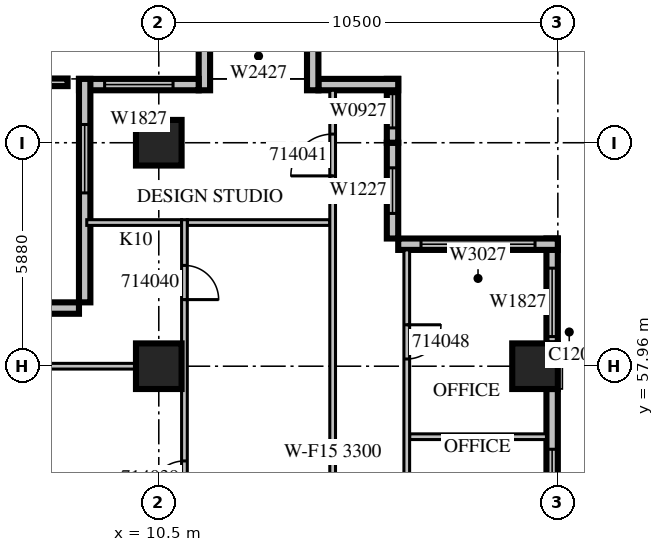
"""IFC4 building model, lengths in metres.
Left out: names, types, materials, properties, quantities, classifications, styles, units other than length and angle.
Written with IfcOpenShell. Run it as: python <this file> out.ifc"""

import sys

from ifc_helpers import new_model, si_unit, direction, frame, frame_2d, origin, origin_2d, place, context, subcontext, project, spatial, rectangle, extrude, source, transform, mapped, element, fill, save


model = new_model("IFC4")
c1 = context("Model", 3, precision=1e-05, world=origin(), true_north=direction((0.0, 1.0)))
c2 = subcontext(c1, "Body", "Model", "MODEL_VIEW")
j1 = project(units=[si_unit("LENGTHUNIT", "METRE"), si_unit("PLANEANGLEUNIT", "RADIAN")], contexts=[c1])
p1 = place(None, origin())
s1 = spatial("IfcSite", under=j1, at=p1, CompositionType="ELEMENT")
p2 = place(p1, origin())
s2 = spatial("IfcBuilding", under=s1, at=p2, CompositionType="ELEMENT")
p3 = place(p2, frame((0.0, 0.0, 69.9)))
s3 = spatial("IfcBuildingStorey", under=s2, at=p3, CompositionType="ELEMENT", Elevation=69.9)
m1 = source(origin(), c2, "Body", "SweptSolid", [
    extrude(rectangle(XDim=1.2, YDim=1.2, at=origin_2d()), origin(), (0.0, 0.0, 1.0), 4.2),
])
for number, where, z_axis, x_axis in (
    (1, (10.5, 57.96, 0.0), (0.0, 0.0, 1.0), (1.0, 0.0, 0.0)),
    (2, (20.4, 57.96, 0.0), (0.0, 0.0, 1.0), (1.0, 0.0, 0.0)),
    (3, (10.5, 63.84, 0.0), (0.0, 0.0, 1.0), (1.0, 0.0, 0.0)),
):
    element("IfcColumn", number, at=place(p3, frame(where, z_axis=z_axis, x_axis=x_axis)), inside=s3, PredefinedType="COLUMN", context=c2, shape_type="MappedRepresentation", body=[
        mapped(m1, transform((0.0, 0.0, 0.0), scale=1.0)),
    ])
m2 = source(origin(), c2, "Body", "SweptSolid", [
    extrude(rectangle(XDim=4.68, YDim=0.3, at=frame_2d((2.34, 0.0))), origin(), (0.0, 0.0, 1.0), 3.8),
])
p4 = place(p3, frame((20.85, 52.68, 0.0), z_axis=(0.0, 0.0, 1.0), x_axis=(0.0, 1.0, 0.0)))
e4 = element("IfcWall", 4, at=p4, inside=s3, PredefinedType="STANDARD", context=c2, shape_type="MappedRepresentation", body=[
    mapped(m2, transform((0.0, 0.0, 0.0), scale=1.0)),
])
m3 = source(origin(), c2, "Body", "SweptSolid", [
    extrude(rectangle(XDim=2.4, YDim=2.7, at=frame_2d((1.2, 1.35))), frame((0.0, 0.16, 0.0), z_axis=(0.0, -1.0, 0.0), x_axis=(1.0, 0.0, 0.0)), (0.0, 0.0, 1.0), 0.32),
])
p5 = place(p4, frame((0.695, 0.0, 0.6)))
e5 = element("IfcOpeningElement", 5, at=p5, cuts=e4, PredefinedType="OPENING", context=c2, shape_type="MappedRepresentation", body=[
    mapped(m3, transform((0.0, 0.0, 0.0), scale=1.0)),
])
m4 = source(origin(), c2, "Body", "SweptSolid", [
    extrude(rectangle(XDim=2.76, YDim=0.3, at=frame_2d((1.38, 0.0))), origin(), (0.0, 0.0, 1.0), 3.8),
])
p6 = place(p3, frame((20.85, 58.56, 0.0), z_axis=(0.0, 0.0, 1.0), x_axis=(0.0, 1.0, 0.0)))
e6 = element("IfcWall", 6, at=p6, inside=s3, PredefinedType="STANDARD", context=c2, shape_type="MappedRepresentation", body=[
    mapped(m4, transform((0.0, 0.0, 0.0), scale=1.0)),
])
m5 = source(origin(), c2, "Body", "SweptSolid", [
    extrude(rectangle(XDim=1.8, YDim=2.7, at=frame_2d((0.9, 1.35))), frame((0.0, 0.16, 0.0), z_axis=(0.0, -1.0, 0.0), x_axis=(1.0, 0.0, 0.0)), (0.0, 0.0, 1.0), 0.32),
])
p7 = place(p6, frame((0.18, 0.0, 0.6)))
e7 = element("IfcOpeningElement", 7, at=p7, cuts=e6, PredefinedType="OPENING", context=c2, shape_type="MappedRepresentation", body=[
    mapped(m5, transform((0.0, 0.0, 0.0), scale=1.0)),
])
m6 = source(origin(), c2, "Body", "SweptSolid", [
    extrude(rectangle(XDim=4.2, YDim=0.3, at=frame_2d((2.1, 0.0))), origin(), (0.0, 0.0, 1.0), 3.8),
])
p8 = place(p3, frame((21.0, 61.17, 0.0), z_axis=(0.0, 0.0, 1.0), x_axis=(-1.0, 0.0, 0.0)))
e8 = element("IfcWall", 8, at=p8, inside=s3, PredefinedType="STANDARD", context=c2, shape_type="MappedRepresentation", body=[
    mapped(m6, transform((0.0, 0.0, 0.0), scale=1.0)),
])
m7 = source(origin(), c2, "Body", "SweptSolid", [
    extrude(rectangle(XDim=3.0, YDim=2.7, at=frame_2d((1.5, 1.35))), frame((0.0, 0.16, 0.0), z_axis=(0.0, -1.0, 0.0), x_axis=(1.0, 0.0, 0.0)), (0.0, 0.0, 1.0), 0.32),
])
p9 = place(p8, frame((0.6, 0.0, 0.6)))
e9 = element("IfcOpeningElement", 9, at=p9, cuts=e8, PredefinedType="OPENING", context=c2, shape_type="MappedRepresentation", body=[
    mapped(m7, transform((0.0, 0.0, 0.0), scale=1.0)),
])
m8 = source(origin(), c2, "Body", "SweptSolid", [
    extrude(rectangle(XDim=2.52, YDim=0.3, at=frame_2d((1.26, 0.0))), origin(), (0.0, 0.0, 1.0), 3.8),
])
p10 = place(p3, frame((16.65, 61.32, 0.0), z_axis=(0.0, 0.0, 1.0), x_axis=(0.0, 1.0, 0.0)))
e10 = element("IfcWall", 10, at=p10, inside=s3, PredefinedType="STANDARD", context=c2, shape_type="MappedRepresentation", body=[
    mapped(m8, transform((0.0, 0.0, 0.0), scale=1.0)),
])
m9 = source(origin(), c2, "Body", "SweptSolid", [
    extrude(rectangle(XDim=1.2, YDim=2.7, at=frame_2d((0.6, 1.35))), frame((0.0, 0.16, 0.0), z_axis=(0.0, -1.0, 0.0), x_axis=(1.0, 0.0, 0.0)), (0.0, 0.0, 1.0), 0.32),
])
p11 = place(p10, frame((0.66, 0.0, 0.6)))
e11 = element("IfcOpeningElement", 11, at=p11, cuts=e10, PredefinedType="OPENING", context=c2, shape_type="MappedRepresentation", body=[
    mapped(m9, transform((0.0, 0.0, 0.0), scale=1.0)),
])
m10 = source(origin(), c2, "Body", "SweptSolid", [
    extrude(rectangle(XDim=1.68, YDim=0.3, at=frame_2d((0.84, 0.0))), origin(), (0.0, 0.0, 1.0), 3.8),
])
p12 = place(p3, frame((16.65, 63.84, 0.0), z_axis=(0.0, 0.0, 1.0), x_axis=(0.0, 1.0, 0.0)))
e12 = element("IfcWall", 12, at=p12, inside=s3, PredefinedType="STANDARD", context=c2, shape_type="MappedRepresentation", body=[
    mapped(m10, transform((0.0, 0.0, 0.0), scale=1.0)),
])
m11 = source(origin(), c2, "Body", "SweptSolid", [
    extrude(rectangle(XDim=0.9, YDim=2.7, at=frame_2d((0.45, 1.35))), frame((0.0, 0.16, 0.0), z_axis=(0.0, -1.0, 0.0), x_axis=(1.0, 0.0, 0.0)), (0.0, 0.0, 1.0), 0.32),
])
p13 = place(p12, frame((0.39, 0.0, 0.6)))
e13 = element("IfcOpeningElement", 13, at=p13, cuts=e12, PredefinedType="OPENING", context=c2, shape_type="MappedRepresentation", body=[
    mapped(m11, transform((0.0, 0.0, 0.0), scale=1.0)),
])
p14 = place(p3, frame((16.8, 65.37, 0.0), z_axis=(0.0, 0.0, 1.0), x_axis=(-1.0, 0.0, 0.0)))
e14 = element("IfcWall", 14, at=p14, inside=s3, PredefinedType="STANDARD", context=c2, shape_type="SweptSolid", body=[
    extrude(rectangle(XDim=2.1, YDim=0.3, at=frame_2d((1.05, 0.0))), origin(), (0.0, 0.0, 1.0), 3.8),
])
m12 = source(origin(), c2, "Body", "SweptSolid", [
    extrude(rectangle(XDim=1.2, YDim=0.3, at=frame_2d((0.6, 0.0))), origin(), (0.0, 0.0, 1.0), 3.8),
])
for number, where, z_axis, x_axis in (
    (15, (14.55, 65.22, 0.0), (0.0, 0.0, 1.0), (0.0, 1.0, 0.0)),
    (16, (11.7, 65.22, 0.0), (0.0, 0.0, 1.0), (0.0, 1.0, 0.0)),
):
    element("IfcWall", number, at=place(p3, frame(where, z_axis=z_axis, x_axis=x_axis)), inside=s3, PredefinedType="STANDARD", context=c2, shape_type="MappedRepresentation", body=[
        mapped(m12, transform((0.0, 0.0, 0.0), scale=1.0)),
    ])
m13 = source(origin(), c2, "Body", "SweptSolid", [
    extrude(rectangle(XDim=3.15, YDim=0.3, at=frame_2d((1.575, 0.0))), origin(), (0.0, 0.0, 1.0), 3.8),
])
p15 = place(p3, frame((11.55, 65.37, 0.0), z_axis=(0.0, 0.0, 1.0), x_axis=(-1.0, 0.0, 0.0)))
e17 = element("IfcWall", 17, at=p15, inside=s3, PredefinedType="STANDARD", context=c2, shape_type="MappedRepresentation", body=[
    mapped(m13, transform((0.0, 0.0, 0.0), scale=1.0)),
])
p16 = place(p15, frame((0.675, 0.0, 0.6)))
e18 = element("IfcOpeningElement", 18, at=p16, cuts=e17, PredefinedType="OPENING", context=c2, shape_type="MappedRepresentation", body=[
    mapped(m5, transform((0.0, 0.0, 0.0), scale=1.0)),
])
m14 = source(origin(), c2, "Body", "SweptSolid", [
    extrude(rectangle(XDim=5.88, YDim=0.3, at=frame_2d((2.94, 0.0))), origin(), (0.0, 0.0, 1.0), 3.8),
])
p17 = place(p3, frame((8.55, 65.52, 0.0), z_axis=(0.0, 0.0, 1.0), x_axis=(0.0, -1.0, 0.0)))
e19 = element("IfcWall", 19, at=p17, inside=s3, PredefinedType="STANDARD", context=c2, shape_type="MappedRepresentation", body=[
    mapped(m14, transform((0.0, 0.0, 0.0), scale=1.0)),
])
m15 = source(origin(), c2, "Body", "SweptSolid", [
    extrude(rectangle(XDim=1.8, YDim=2.4, at=frame_2d((0.9, 1.2))), frame((0.0, 0.16, 0.0), z_axis=(0.0, -1.0, 0.0), x_axis=(1.0, 0.0, 0.0)), (0.0, 0.0, 1.0), 0.32),
])
p18 = place(p17, frame((1.2, 0.0, 0.0)))
e20 = element("IfcOpeningElement", 20, at=p18, cuts=e19, PredefinedType="OPENING", context=c2, shape_type="MappedRepresentation", body=[
    mapped(m15, transform((0.0, 0.0, 0.0), scale=1.0)),
])
p19 = place(p3, frame((8.4, 59.49, 0.0), z_axis=(0.0, 0.0, 1.0), x_axis=(-1.0, 0.0, 0.0)))
e21 = element("IfcWall", 21, at=p19, inside=s3, PredefinedType="STANDARD", context=c2, shape_type="SweptSolid", body=[
    extrude(rectangle(XDim=8.4, YDim=0.3, at=frame_2d((4.2, 0.0))), origin(), (0.0, 0.0, 1.0), 3.8),
])
p20 = place(p19, frame((1.2, 0.0, 0.0)))
e22 = element("IfcOpeningElement", 22, at=p20, cuts=e21, PredefinedType="OPENING", context=c2, shape_type="MappedRepresentation", body=[
    mapped(m15, transform((0.0, 0.0, 0.0), scale=1.0)),
])
p21 = place(p19, frame((4.8, 0.0, 0.6)))
e23 = element("IfcOpeningElement", 23, at=p21, cuts=e21, PredefinedType="OPENING", context=c2, shape_type="MappedRepresentation", body=[
    mapped(m7, transform((0.0, 0.0, 0.0), scale=1.0)),
])
p22 = place(p3, frame((4.29, 65.43, 0.0), z_axis=(0.0, 0.0, 1.0), x_axis=(1.0, 0.0, 0.0)))
e24 = element("IfcWall", 24, at=p22, inside=s3, PredefinedType="PARAPET", context=c2, shape_type="SweptSolid", body=[
    extrude(rectangle(XDim=3.81, YDim=0.2, at=frame_2d((1.905, 0.0))), origin(), (0.0, 0.0, 1.0), 1.1),
])
m16 = source(origin(), c2, "Body", "SweptSolid", [
    extrude(rectangle(XDim=8.702, YDim=0.15, at=frame_2d((4.351, 0.0))), origin(), (0.0, 0.0, 1.0), 3.8),
])
p23 = place(p3, frame((9.901, 57.96, 0.0), z_axis=(0.0, 0.0, 1.0), x_axis=(-1.0, 0.0, 0.0)))
e25 = element("IfcWall", 25, at=p23, inside=s3, PredefinedType="PARTITIONING", context=c2, shape_type="MappedRepresentation", body=[
    mapped(m16, transform((0.0, 0.0, 0.0), scale=1.0)),
])
p24 = place(p3, frame((11.1, 61.74, 0.0), z_axis=(0.0, 0.0, 1.0), x_axis=(-1.0, 0.0, 0.0)))
e26 = element("IfcWall", 26, at=p24, inside=s3, PredefinedType="PARTITIONING", context=c2, shape_type="SweptSolid", body=[
    extrude(rectangle(XDim=2.495, YDim=0.15, at=frame_2d((1.248, 0.0))), origin(), (0.0, 0.0, 1.0), 3.8),
])
m17 = source(origin(), c2, "Body", "SweptSolid", [
    extrude(rectangle(XDim=3.75, YDim=0.15, at=frame_2d((1.875, 0.0))), origin(), (0.0, 0.0, 1.0), 3.8),
])
p25 = place(p3, frame((15.0, 61.74, 0.0), z_axis=(0.0, 0.0, 1.0), x_axis=(-1.0, 0.0, 0.0)))
e27 = element("IfcWall", 27, at=p25, inside=s3, PredefinedType="PARTITIONING", context=c2, shape_type="MappedRepresentation", body=[
    mapped(m17, transform((0.0, 0.0, 0.0), scale=1.0)),
])
p26 = place(p3, frame((11.175, 46.2, 0.0), z_axis=(0.0, 0.0, 1.0), x_axis=(0.0, 1.0, 0.0)))
e28 = element("IfcWall", 28, at=p26, inside=s3, PredefinedType="PARTITIONING", context=c2, shape_type="SweptSolid", body=[
    extrude(rectangle(XDim=15.615, YDim=0.15, at=frame_2d((7.808, 0.0))), origin(), (0.0, 0.0, 1.0), 3.3),
])
m18 = source(origin(), c2, "Body", "SweptSolid", [
    extrude(rectangle(XDim=0.9, YDim=2.1, at=frame_2d((0.45, 1.05))), frame((0.0, 0.085, 0.0), z_axis=(0.0, -1.0, 0.0), x_axis=(1.0, 0.0, 0.0)), (0.0, 0.0, 1.0), 0.17),
])
p27 = place(p26, frame((2.487, 0.0, 0.0)))
e29 = element("IfcOpeningElement", 29, at=p27, cuts=e28, PredefinedType="OPENING", context=c2, shape_type="MappedRepresentation", body=[
    mapped(m18, transform((0.0, 0.0, 0.0), scale=1.0)),
])
p28 = place(p26, frame((8.367, 0.0, 0.0)))
e30 = element("IfcOpeningElement", 30, at=p28, cuts=e28, PredefinedType="OPENING", context=c2, shape_type="MappedRepresentation", body=[
    mapped(m18, transform((0.0, 0.0, 0.0), scale=1.0)),
])
p29 = place(p26, frame((13.512, 0.0, 0.0)))
e31 = element("IfcOpeningElement", 31, at=p29, cuts=e28, PredefinedType="OPENING", context=c2, shape_type="MappedRepresentation", body=[
    mapped(m18, transform((0.0, 0.0, 0.0), scale=1.0)),
])
m19 = source(origin(), c2, "Body", "SweptSolid", [
    extrude(rectangle(XDim=3.6, YDim=0.15, at=frame_2d((1.8, 0.0))), origin(), (0.0, 0.0, 1.0), 3.8),
])
p30 = place(p3, frame((17.1, 56.105, 0.0), z_axis=(0.0, 0.0, 1.0), x_axis=(1.0, 0.0, 0.0)))
e32 = element("IfcWall", 32, at=p30, inside=s3, PredefinedType="PARTITIONING", context=c2, shape_type="MappedRepresentation", body=[
    mapped(m19, transform((0.0, 0.0, 0.0), scale=1.0)),
])
m20 = source(origin(), c2, "Body", "SweptSolid", [
    extrude(rectangle(XDim=19.02, YDim=0.15, at=frame_2d((9.51, 0.0))), origin(), (0.0, 0.0, 1.0), 3.3),
])
p31 = place(p3, frame((15.075, 46.2, 0.0), z_axis=(0.0, 0.0, 1.0), x_axis=(0.0, 1.0, 0.0)))
e33 = element("IfcWall", 33, at=p31, inside=s3, PredefinedType="PARTITIONING", context=c2, shape_type="MappedRepresentation", body=[
    mapped(m20, transform((0.0, 0.0, 0.0), scale=1.0)),
])
m21 = source(origin(), c2, "Body", "SweptSolid", [
    extrude(rectangle(XDim=1.2, YDim=2.1, at=frame_2d((0.6, 1.05))), frame((0.0, 0.085, 0.0), z_axis=(0.0, -1.0, 0.0), x_axis=(1.0, 0.0, 0.0)), (0.0, 0.0, 1.0), 0.17),
])
p32 = place(p31, frame((7.17, 0.0, 0.0)))
e34 = element("IfcOpeningElement", 34, at=p32, cuts=e33, PredefinedType="OPENING", context=c2, shape_type="MappedRepresentation", body=[
    mapped(m21, transform((0.0, 0.0, 0.0), scale=1.0)),
])
m22 = source(origin(), c2, "Body", "SweptSolid", [
    extrude(rectangle(XDim=1.1, YDim=2.1, at=frame_2d((0.55, 1.05))), frame((0.0, 0.085, 0.0), z_axis=(0.0, -1.0, 0.0), x_axis=(1.0, 0.0, 0.0)), (0.0, 0.0, 1.0), 0.17),
])
p33 = place(p31, frame((16.767, 0.0, 0.0)))
e35 = element("IfcOpeningElement", 35, at=p33, cuts=e33, PredefinedType="OPENING", context=c2, shape_type="MappedRepresentation", body=[
    mapped(m22, transform((0.0, 0.0, 0.0), scale=1.0)),
])
m23 = source(origin(), c2, "Body", "SweptSolid", [
    extrude(rectangle(XDim=31.62, YDim=0.15, at=frame_2d((15.81, 0.0))), origin(), (0.0, 0.0, 1.0), 3.3),
])
p34 = place(p3, frame((17.025, 61.02, 0.0), z_axis=(0.0, 0.0, 1.0), x_axis=(0.0, -1.0, 0.0)))
e36 = element("IfcWall", 36, at=p34, inside=s3, PredefinedType="PARTITIONING", context=c2, shape_type="MappedRepresentation", body=[
    mapped(m23, transform((0.0, 0.0, 0.0), scale=1.0)),
])
m24 = source(origin(), c2, "Body", "SweptSolid", [
    extrude(rectangle(XDim=1.0, YDim=2.1, at=frame_2d((0.5, 1.05))), frame((0.0, 0.085, 0.0), z_axis=(0.0, -1.0, 0.0), x_axis=(1.0, 0.0, 0.0)), (0.0, 0.0, 1.0), 0.17),
])
p35 = place(p34, frame((29.263, 0.0, 0.0)))
e37 = element("IfcOpeningElement", 37, at=p35, cuts=e36, PredefinedType="OPENING", context=c2, shape_type="MappedRepresentation", body=[
    mapped(m24, transform((0.0, 0.0, 0.0), scale=1.0)),
])
p36 = place(p34, frame((25.951, 0.0, 0.0)))
e38 = element("IfcOpeningElement", 38, at=p36, cuts=e36, PredefinedType="OPENING", context=c2, shape_type="MappedRepresentation", body=[
    mapped(m24, transform((0.0, 0.0, 0.0), scale=1.0)),
])
p37 = place(p34, frame((23.608, 0.0, 0.0)))
e39 = element("IfcOpeningElement", 39, at=p37, cuts=e36, PredefinedType="OPENING", context=c2, shape_type="MappedRepresentation", body=[
    mapped(m24, transform((0.0, 0.0, 0.0), scale=1.0)),
])
p38 = place(p34, frame((18.42, 0.0, 0.0)))
e40 = element("IfcOpeningElement", 40, at=p38, cuts=e36, PredefinedType="OPENING", context=c2, shape_type="MappedRepresentation", body=[
    mapped(m21, transform((0.0, 0.0, 0.0), scale=1.0)),
])
p39 = place(p34, frame((11.875, 0.0, 0.0)))
e41 = element("IfcOpeningElement", 41, at=p39, cuts=e36, PredefinedType="OPENING", context=c2, shape_type="MappedRepresentation", body=[
    mapped(m18, transform((0.0, 0.0, 0.0), scale=1.0)),
])
p40 = place(p34, frame((6.923, 0.0, 0.0)))
e42 = element("IfcOpeningElement", 42, at=p40, cuts=e36, PredefinedType="OPENING", context=c2, shape_type="MappedRepresentation", body=[
    mapped(m18, transform((0.0, 0.0, 0.0), scale=1.0)),
])
p41 = place(p34, frame((1.97, 0.0, 0.0)))
e43 = element("IfcOpeningElement", 43, at=p41, cuts=e36, PredefinedType="OPENING", context=c2, shape_type="MappedRepresentation", body=[
    mapped(m18, transform((0.0, 0.0, 0.0), scale=1.0)),
])
m25 = source(origin(), c2, "Body", "SweptSolid", [
    extrude(rectangle(XDim=2.4, YDim=2.7, at=frame_2d((1.2, 1.35))), frame((0.0, 0.03, 0.0), z_axis=(0.0, -1.0, 0.0), x_axis=(1.0, 0.0, 0.0)), (0.0, 0.0, 1.0), 0.06),
])
p42 = place(p5, origin())
e44 = element("IfcWindow", 44, at=p42, inside=s3, PartitioningType="SINGLE_PANEL", PredefinedType="WINDOW", context=c2, shape_type="MappedRepresentation", body=[
    mapped(m25, transform((0.0, 0.0, 0.0), scale=1.0)),
])
fill(e5, e44)
m26 = source(origin(), c2, "Body", "SweptSolid", [
    extrude(rectangle(XDim=1.8, YDim=2.7, at=frame_2d((0.9, 1.35))), frame((0.0, 0.03, 0.0), z_axis=(0.0, -1.0, 0.0), x_axis=(1.0, 0.0, 0.0)), (0.0, 0.0, 1.0), 0.06),
])
p43 = place(p7, origin())
e45 = element("IfcWindow", 45, at=p43, inside=s3, PartitioningType="SINGLE_PANEL", PredefinedType="WINDOW", context=c2, shape_type="MappedRepresentation", body=[
    mapped(m26, transform((0.0, 0.0, 0.0), scale=1.0)),
])
fill(e7, e45)
m27 = source(origin(), c2, "Body", "SweptSolid", [
    extrude(rectangle(XDim=3.0, YDim=2.7, at=frame_2d((1.5, 1.35))), frame((0.0, 0.03, 0.0), z_axis=(0.0, -1.0, 0.0), x_axis=(1.0, 0.0, 0.0)), (0.0, 0.0, 1.0), 0.06),
])
p44 = place(p9, origin())
e46 = element("IfcWindow", 46, at=p44, inside=s3, PartitioningType="SINGLE_PANEL", PredefinedType="WINDOW", context=c2, shape_type="MappedRepresentation", body=[
    mapped(m27, transform((0.0, 0.0, 0.0), scale=1.0)),
])
fill(e9, e46)
m28 = source(origin(), c2, "Body", "SweptSolid", [
    extrude(rectangle(XDim=1.2, YDim=2.7, at=frame_2d((0.6, 1.35))), frame((0.0, 0.03, 0.0), z_axis=(0.0, -1.0, 0.0), x_axis=(1.0, 0.0, 0.0)), (0.0, 0.0, 1.0), 0.06),
])
p45 = place(p11, origin())
e47 = element("IfcWindow", 47, at=p45, inside=s3, PartitioningType="SINGLE_PANEL", PredefinedType="WINDOW", context=c2, shape_type="MappedRepresentation", body=[
    mapped(m28, transform((0.0, 0.0, 0.0), scale=1.0)),
])
fill(e11, e47)
m29 = source(origin(), c2, "Body", "SweptSolid", [
    extrude(rectangle(XDim=0.9, YDim=2.7, at=frame_2d((0.45, 1.35))), frame((0.0, 0.03, 0.0), z_axis=(0.0, -1.0, 0.0), x_axis=(1.0, 0.0, 0.0)), (0.0, 0.0, 1.0), 0.06),
])
p46 = place(p13, origin())
e48 = element("IfcWindow", 48, at=p46, inside=s3, PartitioningType="SINGLE_PANEL", PredefinedType="WINDOW", context=c2, shape_type="MappedRepresentation", body=[
    mapped(m29, transform((0.0, 0.0, 0.0), scale=1.0)),
])
fill(e13, e48)
p47 = place(p16, origin())
e49 = element("IfcWindow", 49, at=p47, inside=s3, PartitioningType="SINGLE_PANEL", PredefinedType="WINDOW", context=c2, shape_type="MappedRepresentation", body=[
    mapped(m26, transform((0.0, 0.0, 0.0), scale=1.0)),
])
fill(e18, e49)
m30 = source(origin(), c2, "Body", "SweptSolid", [
    extrude(rectangle(XDim=1.8, YDim=2.4, at=frame_2d((0.9, 1.2))), frame((0.0, 0.025, 0.0), z_axis=(0.0, -1.0, 0.0), x_axis=(1.0, 0.0, 0.0)), (0.0, 0.0, 1.0), 0.05),
])
p48 = place(p18, origin())
e50 = element("IfcDoor", 50, at=p48, inside=s3, OperationType="SLIDING_TO_LEFT", PredefinedType="DOOR", context=c2, shape_type="MappedRepresentation", body=[
    mapped(m30, transform((0.0, 0.0, 0.0), scale=1.0)),
])
fill(e20, e50)
m31 = source(origin(), c2, "Body", "SweptSolid", [
    extrude(rectangle(XDim=0.9, YDim=2.1, at=frame_2d((0.45, 1.05))), frame((0.0, 0.025, 0.0), z_axis=(0.0, -1.0, 0.0), x_axis=(1.0, 0.0, 0.0)), (0.0, 0.0, 1.0), 0.05),
])
p49 = place(p28, origin())
e51 = element("IfcDoor", 51, at=p49, inside=s3, OperationType="SINGLE_SWING_LEFT", PredefinedType="DOOR", context=c2, shape_type="MappedRepresentation", body=[
    mapped(m31, transform((0.0, 0.0, 0.0), scale=1.0)),
])
fill(e30, e51)
p50 = place(p29, origin())
e52 = element("IfcDoor", 52, at=p50, inside=s3, OperationType="SINGLE_SWING_RIGHT", PredefinedType="DOOR", context=c2, shape_type="MappedRepresentation", body=[
    mapped(m31, transform((0.0, 0.0, 0.0), scale=1.0)),
])
fill(e31, e52)
m32 = source(origin(), c2, "Body", "SweptSolid", [
    extrude(rectangle(XDim=1.1, YDim=2.1, at=frame_2d((0.55, 1.05))), frame((0.0, 0.025, 0.0), z_axis=(0.0, -1.0, 0.0), x_axis=(1.0, 0.0, 0.0)), (0.0, 0.0, 1.0), 0.05),
])
p51 = place(p33, origin())
e53 = element("IfcDoor", 53, at=p51, inside=s3, OperationType="SINGLE_SWING_LEFT", PredefinedType="DOOR", context=c2, shape_type="MappedRepresentation", body=[
    mapped(m32, transform((0.0, 0.0, 0.0), scale=1.0)),
])
fill(e35, e53)
p52 = place(p41, origin())
e54 = element("IfcDoor", 54, at=p52, inside=s3, OperationType="SINGLE_SWING_LEFT", PredefinedType="DOOR", context=c2, shape_type="MappedRepresentation", body=[
    mapped(m31, transform((0.0, 0.0, 0.0), scale=1.0)),
])
fill(e43, e54)
save(model, sys.argv[1])
